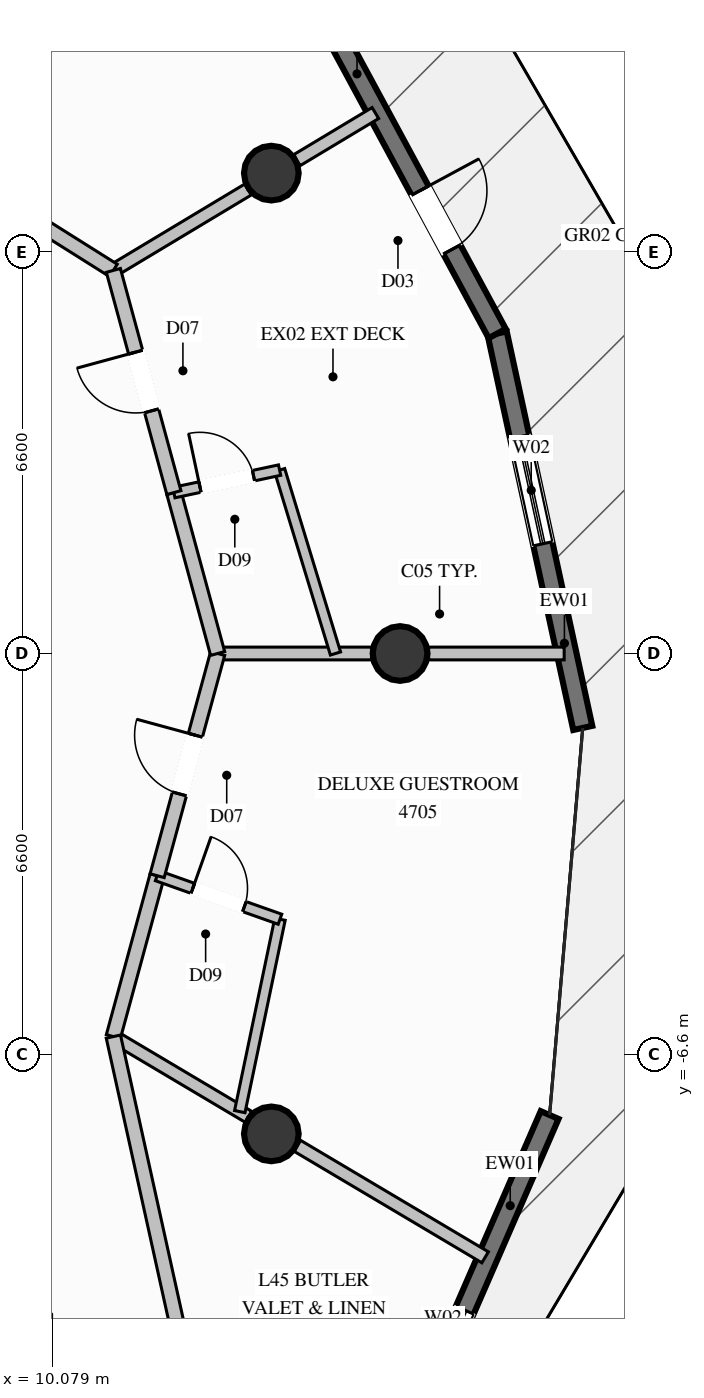
"""IFC4 building model, lengths in metres.
Left out: names, types, materials, properties, quantities, classifications, styles, units other than length and angle.
Written with IfcOpenShell. Run it as: python <this file> out.ifc"""

import sys

from ifc_helpers import new_model, si_unit, direction, frame, frame_2d, origin, origin_2d, place, context, subcontext, project, spatial, rectangle, circle, extrude, element, fill, save


model = new_model("IFC4")
c1 = context("Model", 3, precision=1e-05, world=origin(), true_north=direction((0.0, 1.0)))
c2 = subcontext(c1, "Body", "Model", "MODEL_VIEW")
j1 = project(units=[si_unit("LENGTHUNIT", "METRE"), si_unit("PLANEANGLEUNIT", "RADIAN")], contexts=[c1])
p1 = place(None, origin())
s1 = spatial("IfcSite", under=j1, at=p1, CompositionType="ELEMENT")
p2 = place(p1, origin())
s2 = spatial("IfcBuilding", under=s1, at=p2, CompositionType="ELEMENT")
p3 = place(p2, frame((0.0, 0.0, 176.8)))
s3 = spatial("IfcBuildingStorey", under=s2, at=p3, CompositionType="ELEMENT", Elevation=176.8)
for number, where, z_axis, x_axis in (
    (1, (15.8, 0.0, 0.0), (0.0, 0.0, 1.0), (1.0, 0.0, 0.0)),
    (2, (13.683, 7.9, 0.0), (0.0, 0.0, 1.0), (1.0, 0.0, 0.0)),
    (3, (13.683, -7.9, 0.0), (0.0, 0.0, 1.0), (1.0, 0.0, 0.0)),
):
    element("IfcColumn", number, at=place(p3, frame(where, z_axis=z_axis, x_axis=x_axis)), inside=s3, PredefinedType="COLUMN", context=c2, shape_type="SweptSolid", body=[
        extrude(circle(Radius=0.45, at=origin_2d()), origin(), (0.0, 0.0, 1.0), 3.6),
    ])
p4 = place(p3, frame((18.26, -7.59, 0.0), z_axis=(0.0, 0.0, 1.0), x_axis=(-0.398911001453, -0.916989647117, 0.0)))
e4 = element("IfcWall", 4, at=p4, inside=s3, PredefinedType="SOLIDWALL", context=c2, shape_type="SweptSolid", body=[
    extrude(rectangle(XDim=6.132, YDim=0.32, at=frame_2d((3.066, 0.0))), origin(), (0.0, 0.0, 1.0), 3.36),
])
p5 = place(p4, frame((3.5, 0.0, 0.35)))
e5 = element("IfcOpeningElement", 5, at=p5, cuts=e4, PredefinedType="OPENING", context=c2, shape_type="SweptSolid", body=[
    extrude(rectangle(XDim=1.8, YDim=2.6, at=frame_2d((0.9, 1.3))), frame((0.0, 0.17, 0.0), z_axis=(0.0, -1.0, 0.0), x_axis=(1.0, 0.0, 0.0)), (0.0, 0.0, 1.0), 0.34),
])
p6 = place(p3, frame((17.398, 5.262, 0.0), z_axis=(0.0, 0.0, 1.0), x_axis=(0.211992849193, -0.977271217161, 0.0)))
e6 = element("IfcWall", 6, at=p6, inside=s3, PredefinedType="SOLIDWALL", context=c2, shape_type="SweptSolid", body=[
    extrude(rectangle(XDim=6.637, YDim=0.32, at=frame_2d((3.318, 0.0))), origin(), (0.0, 0.0, 1.0), 3.36),
])
p7 = place(p6, frame((1.738, 0.0, 0.35)))
e7 = element("IfcOpeningElement", 7, at=p7, cuts=e6, PredefinedType="OPENING", context=c2, shape_type="SweptSolid", body=[
    extrude(rectangle(XDim=1.8, YDim=2.6, at=frame_2d((0.9, 1.3))), frame((0.0, 0.17, 0.0), z_axis=(0.0, -1.0, 0.0), x_axis=(1.0, 0.0, 0.0)), (0.0, 0.0, 1.0), 0.34),
])
p8 = place(p3, frame((14.174, 11.232, 0.0), z_axis=(0.0, 0.0, 1.0), x_axis=(0.475159501302, -0.879899680829, 0.0)))
e8 = element("IfcWall", 8, at=p8, inside=s3, PredefinedType="SOLIDWALL", context=c2, shape_type="SweptSolid", body=[
    extrude(rectangle(XDim=6.785, YDim=0.32, at=frame_2d((3.393, 0.0))), origin(), (0.0, 0.0, 1.0), 3.36),
])
p9 = place(p8, frame((4.114, 0.0, 0.0)))
e9 = element("IfcOpeningElement", 9, at=p9, cuts=e8, PredefinedType="OPENING", context=c2, shape_type="SweptSolid", body=[
    extrude(rectangle(XDim=1.1, YDim=2.2, at=frame_2d((0.55, 1.1))), frame((0.0, 0.17, 0.0), z_axis=(0.0, -1.0, 0.0), x_axis=(1.0, 0.0, 0.0)), (0.0, 0.0, 1.0), 0.34),
])
p10 = place(p3, frame((12.8, 0.0, 0.0), z_axis=(0.0, 0.0, 1.0), x_axis=(1.0, 0.0, 0.0)))
e10 = element("IfcWall", 10, at=p10, inside=s3, PredefinedType="PARTITIONING", context=c2, shape_type="SweptSolid", body=[
    extrude(rectangle(XDim=2.53, YDim=0.21, at=frame_2d((1.265, 0.0))), origin(), (0.0, 0.0, 1.0), 3.36),
])
p11 = place(p3, frame((16.27, 0.0, 0.0), z_axis=(0.0, 0.0, 1.0), x_axis=(1.0, 0.0, 0.0)))
e11 = element("IfcWall", 11, at=p11, inside=s3, PredefinedType="PARTITIONING", context=c2, shape_type="SweptSolid", body=[
    extrude(rectangle(XDim=2.229, YDim=0.21, at=frame_2d((1.115, 0.0))), origin(), (0.0, 0.0, 1.0), 3.36),
])
p12 = place(p3, frame((11.085, 6.3, 0.0), z_axis=(0.0, 0.0, 1.0), x_axis=(0.857259301733, 0.514884928497, 0.0)))
e12 = element("IfcWall", 12, at=p12, inside=s3, PredefinedType="PARTITIONING", context=c2, shape_type="SweptSolid", body=[
    extrude(rectangle(XDim=2.583, YDim=0.21, at=frame_2d((1.292, 0.0))), origin(), (0.0, 0.0, 1.0), 2.876),
])
p13 = place(p3, frame((14.102, 8.112, 0.0), z_axis=(0.0, 0.0, 1.0), x_axis=(0.85729274583, 0.514829241543, 0.0)))
e13 = element("IfcWall", 13, at=p13, inside=s3, PredefinedType="PARTITIONING", context=c2, shape_type="SweptSolid", body=[
    extrude(rectangle(XDim=1.507, YDim=0.21, at=frame_2d((0.753, 0.0))), origin(), (0.0, 0.0, 1.0), 3.36),
])
p14 = place(p3, frame((11.085, -6.3, 0.0), z_axis=(0.0, 0.0, 1.0), x_axis=(0.859827513331, -0.510584613281, 0.0)))
e14 = element("IfcWall", 14, at=p14, inside=s3, PredefinedType="PARTITIONING", context=c2, shape_type="SweptSolid", body=[
    extrude(rectangle(XDim=2.583, YDim=0.21, at=frame_2d((1.292, 0.0))), origin(), (0.0, 0.0, 1.0), 2.876),
])
p15 = place(p3, frame((14.11, -8.096, 0.0), z_axis=(0.0, 0.0, 1.0), x_axis=(0.859858473155, -0.510532473153, 0.0)))
e15 = element("IfcWall", 15, at=p15, inside=s3, PredefinedType="PARTITIONING", context=c2, shape_type="SweptSolid", body=[
    extrude(rectangle(XDim=3.592, YDim=0.21, at=frame_2d((1.796, 0.0))), origin(), (0.0, 0.0, 1.0), 3.36),
])
p16 = place(p3, frame((7.35, 8.65, 0.0), z_axis=(0.0, 0.0, 1.0), x_axis=(0.846409267484, -0.532532958526, 0.0)))
e16 = element("IfcWall", 16, at=p16, inside=s3, PredefinedType="PARTITIONING", context=c2, shape_type="SweptSolid", body=[
    extrude(rectangle(XDim=4.413, YDim=0.24, at=frame_2d((2.206, 0.0))), origin(), (0.0, 0.0, 1.0), 3.36),
])
p17 = place(p16, frame((1.706, 0.0, 0.0)))
e17 = element("IfcOpeningElement", 17, at=p17, cuts=e16, PredefinedType="OPENING", context=c2, shape_type="SweptSolid", body=[
    extrude(rectangle(XDim=1.0, YDim=2.2, at=frame_2d((0.5, 1.1))), frame((0.0, 0.13, 0.0), z_axis=(0.0, -1.0, 0.0), x_axis=(1.0, 0.0, 0.0)), (0.0, 0.0, 1.0), 0.26),
])
p18 = place(p3, frame((11.085, -6.3, 0.0), z_axis=(0.0, 0.0, 1.0), x_axis=(0.262552356383, 0.964917747872, 0.0)))
e18 = element("IfcWall", 18, at=p18, inside=s3, PredefinedType="PARTITIONING", context=c2, shape_type="SweptSolid", body=[
    extrude(rectangle(XDim=2.742, YDim=0.24, at=frame_2d((1.371, 0.0))), origin(), (0.0, 0.0, 1.0), 3.36),
])
p19 = place(p3, frame((13.164, -7.534, 0.0), z_axis=(0.0, 0.0, 1.0), x_axis=(0.204476064812, 0.978871564057, 0.0)))
e19 = element("IfcWall", 19, at=p19, inside=s3, PredefinedType="PLUMBINGWALL", context=c2, shape_type="SweptSolid", body=[
    extrude(rectangle(XDim=3.232, YDim=0.175, at=frame_2d((1.616, 0.0))), origin(), (0.0, 0.0, 1.0), 2.929),
])
p20 = place(p3, frame((11.805, -3.654, 0.0), z_axis=(0.0, 0.0, 1.0), x_axis=(0.942533085892, -0.334112828248, 0.0)))
e20 = element("IfcWall", 20, at=p20, inside=s3, PredefinedType="PLUMBINGWALL", context=c2, shape_type="SweptSolid", body=[
    extrude(rectangle(XDim=2.143, YDim=0.175, at=frame_2d((1.072, 0.0))), origin(), (0.0, 0.0, 1.0), 3.36),
])
p21 = place(p20, frame((0.622, 0.0, 0.0)))
e21 = element("IfcOpeningElement", 21, at=p21, cuts=e20, PredefinedType="OPENING", context=c2, shape_type="SweptSolid", body=[
    extrude(rectangle(XDim=0.9, YDim=2.1, at=frame_2d((0.45, 1.05))), frame((0.0, 0.098, 0.0), z_axis=(0.0, -1.0, 0.0), x_axis=(1.0, 0.0, 0.0)), (0.0, 0.0, 1.0), 0.195),
])
p22 = place(p3, frame((11.805, -3.654, 0.0), z_axis=(0.0, 0.0, 1.0), x_axis=(0.262762825819, 0.964860454868, 0.0)))
e22 = element("IfcWall", 22, at=p22, inside=s3, PredefinedType="PARTITIONING", context=c2, shape_type="SweptSolid", body=[
    extrude(rectangle(XDim=3.787, YDim=0.24, at=frame_2d((1.894, 0.0))), origin(), (0.0, 0.0, 1.0), 3.36),
])
p23 = place(p22, frame((1.394, 0.0, 0.0)))
e23 = element("IfcOpeningElement", 23, at=p23, cuts=e22, PredefinedType="OPENING", context=c2, shape_type="SweptSolid", body=[
    extrude(rectangle(XDim=1.0, YDim=2.2, at=frame_2d((0.5, 1.1))), frame((0.0, 0.13, 0.0), z_axis=(0.0, -1.0, 0.0), x_axis=(1.0, 0.0, 0.0)), (0.0, 0.0, 1.0), 0.26),
])
p24 = place(p3, frame((12.8, 0.0, 0.0), z_axis=(0.0, 0.0, 1.0), x_axis=(-0.262552356383, 0.964917747872, 0.0)))
e24 = element("IfcWall", 24, at=p24, inside=s3, PredefinedType="PARTITIONING", context=c2, shape_type="SweptSolid", body=[
    extrude(rectangle(XDim=2.742, YDim=0.24, at=frame_2d((1.371, 0.0))), origin(), (0.0, 0.0, 1.0), 3.36),
])
p25 = place(p3, frame((14.738, 0.0, 0.0), z_axis=(0.0, 0.0, 1.0), x_axis=(-0.291451232832, 0.956585688206, 0.0)))
e25 = element("IfcWall", 25, at=p25, inside=s3, PredefinedType="PLUMBINGWALL", context=c2, shape_type="SweptSolid", body=[
    extrude(rectangle(XDim=3.153, YDim=0.175, at=frame_2d((1.577, 0.0))), origin(), (0.0, 0.0, 1.0), 3.36),
])
p26 = place(p3, frame((12.08, 2.646, 0.0), z_axis=(0.0, 0.0, 1.0), x_axis=(0.978092843795, 0.208169135363, 0.0)))
e26 = element("IfcWall", 26, at=p26, inside=s3, PredefinedType="PLUMBINGWALL", context=c2, shape_type="SweptSolid", body=[
    extrude(rectangle(XDim=1.778, YDim=0.175, at=frame_2d((0.889, 0.0))), origin(), (0.0, 0.0, 1.0), 3.36),
])
p27 = place(p26, frame((0.439, 0.0, 0.0)))
e27 = element("IfcOpeningElement", 27, at=p27, cuts=e26, PredefinedType="OPENING", context=c2, shape_type="SweptSolid", body=[
    extrude(rectangle(XDim=0.9, YDim=2.1, at=frame_2d((0.45, 1.05))), frame((0.0, 0.098, 0.0), z_axis=(0.0, -1.0, 0.0), x_axis=(1.0, 0.0, 0.0)), (0.0, 0.0, 1.0), 0.195),
])
p28 = place(p3, frame((12.08, 2.646, 0.0), z_axis=(0.0, 0.0, 1.0), x_axis=(-0.262762825819, 0.964860454868, 0.0)))
e28 = element("IfcWall", 28, at=p28, inside=s3, PredefinedType="PARTITIONING", context=c2, shape_type="SweptSolid", body=[
    extrude(rectangle(XDim=3.787, YDim=0.24, at=frame_2d((1.894, 0.0))), origin(), (0.0, 0.0, 1.0), 3.36),
])
p29 = place(p28, frame((1.394, 0.0, 0.0)))
e29 = element("IfcOpeningElement", 29, at=p29, cuts=e28, PredefinedType="OPENING", context=c2, shape_type="SweptSolid", body=[
    extrude(rectangle(XDim=1.0, YDim=2.2, at=frame_2d((0.5, 1.1))), frame((0.0, 0.13, 0.0), z_axis=(0.0, -1.0, 0.0), x_axis=(1.0, 0.0, 0.0)), (0.0, 0.0, 1.0), 0.26),
])
p30 = place(p3, frame((12.3, -11.8, 0.0), z_axis=(0.0, 0.0, 1.0), x_axis=(-0.21572328796, 0.976454537104, 0.0)))
e30 = element("IfcWall", 30, at=p30, inside=s3, PredefinedType="PARTITIONING", context=c2, shape_type="SweptSolid", body=[
    extrude(rectangle(XDim=5.633, YDim=0.24, at=frame_2d((2.816, 0.0))), origin(), (0.0, 0.0, 1.0), 3.36),
])
p31 = place(p5, origin())
e31 = element("IfcWindow", 31, at=p31, inside=s3, PartitioningType="SINGLE_PANEL", PredefinedType="WINDOW", context=c2, shape_type="SweptSolid", body=[
    extrude(rectangle(XDim=1.8, YDim=2.6, at=frame_2d((0.9, 1.3))), frame((0.0, 0.03, 0.0), z_axis=(0.0, -1.0, 0.0), x_axis=(1.0, 0.0, 0.0)), (0.0, 0.0, 1.0), 0.06),
])
fill(e5, e31)
p32 = place(p7, origin())
e32 = element("IfcWindow", 32, at=p32, inside=s3, PartitioningType="SINGLE_PANEL", PredefinedType="WINDOW", context=c2, shape_type="SweptSolid", body=[
    extrude(rectangle(XDim=1.8, YDim=2.6, at=frame_2d((0.9, 1.3))), frame((0.0, 0.03, 0.0), z_axis=(0.0, -1.0, 0.0), x_axis=(1.0, 0.0, 0.0)), (0.0, 0.0, 1.0), 0.06),
])
fill(e7, e32)
p33 = place(p9, origin())
e33 = element("IfcDoor", 33, at=p33, inside=s3, OperationType="SINGLE_SWING_LEFT", PredefinedType="DOOR", context=c2, shape_type="SweptSolid", body=[
    extrude(rectangle(XDim=1.1, YDim=2.2, at=frame_2d((0.55, 1.1))), frame((0.0, 0.025, 0.0), z_axis=(0.0, -1.0, 0.0), x_axis=(1.0, 0.0, 0.0)), (0.0, 0.0, 1.0), 0.05),
])
fill(e9, e33)
p34 = place(p21, origin())
e34 = element("IfcDoor", 34, at=p34, inside=s3, OperationType="SINGLE_SWING_LEFT", PredefinedType="DOOR", context=c2, shape_type="SweptSolid", body=[
    extrude(rectangle(XDim=0.9, YDim=2.1, at=frame_2d((0.45, 1.05))), frame((0.0, 0.025, 0.0), z_axis=(0.0, -1.0, 0.0), x_axis=(1.0, 0.0, 0.0)), (0.0, 0.0, 1.0), 0.05),
])
fill(e21, e34)
p35 = place(p23, origin())
e35 = element("IfcDoor", 35, at=p35, inside=s3, OperationType="SINGLE_SWING_RIGHT", PredefinedType="DOOR", context=c2, shape_type="SweptSolid", body=[
    extrude(rectangle(XDim=1.0, YDim=2.2, at=frame_2d((0.5, 1.1))), frame((0.0, 0.025, 0.0), z_axis=(0.0, -1.0, 0.0), x_axis=(1.0, 0.0, 0.0)), (0.0, 0.0, 1.0), 0.05),
])
fill(e23, e35)
p36 = place(p27, origin())
e36 = element("IfcDoor", 36, at=p36, inside=s3, OperationType="SINGLE_SWING_LEFT", PredefinedType="DOOR", context=c2, shape_type="SweptSolid", body=[
    extrude(rectangle(XDim=0.9, YDim=2.1, at=frame_2d((0.45, 1.05))), frame((0.0, 0.025, 0.0), z_axis=(0.0, -1.0, 0.0), x_axis=(1.0, 0.0, 0.0)), (0.0, 0.0, 1.0), 0.05),
])
fill(e27, e36)
p37 = place(p29, origin())
e37 = element("IfcDoor", 37, at=p37, inside=s3, OperationType="SINGLE_SWING_RIGHT", PredefinedType="DOOR", context=c2, shape_type="SweptSolid", body=[
    extrude(rectangle(XDim=1.0, YDim=2.2, at=frame_2d((0.5, 1.1))), frame((0.0, 0.025, 0.0), z_axis=(0.0, -1.0, 0.0), x_axis=(1.0, 0.0, 0.0)), (0.0, 0.0, 1.0), 0.05),
])
fill(e29, e37)
save(model, sys.argv[1])
